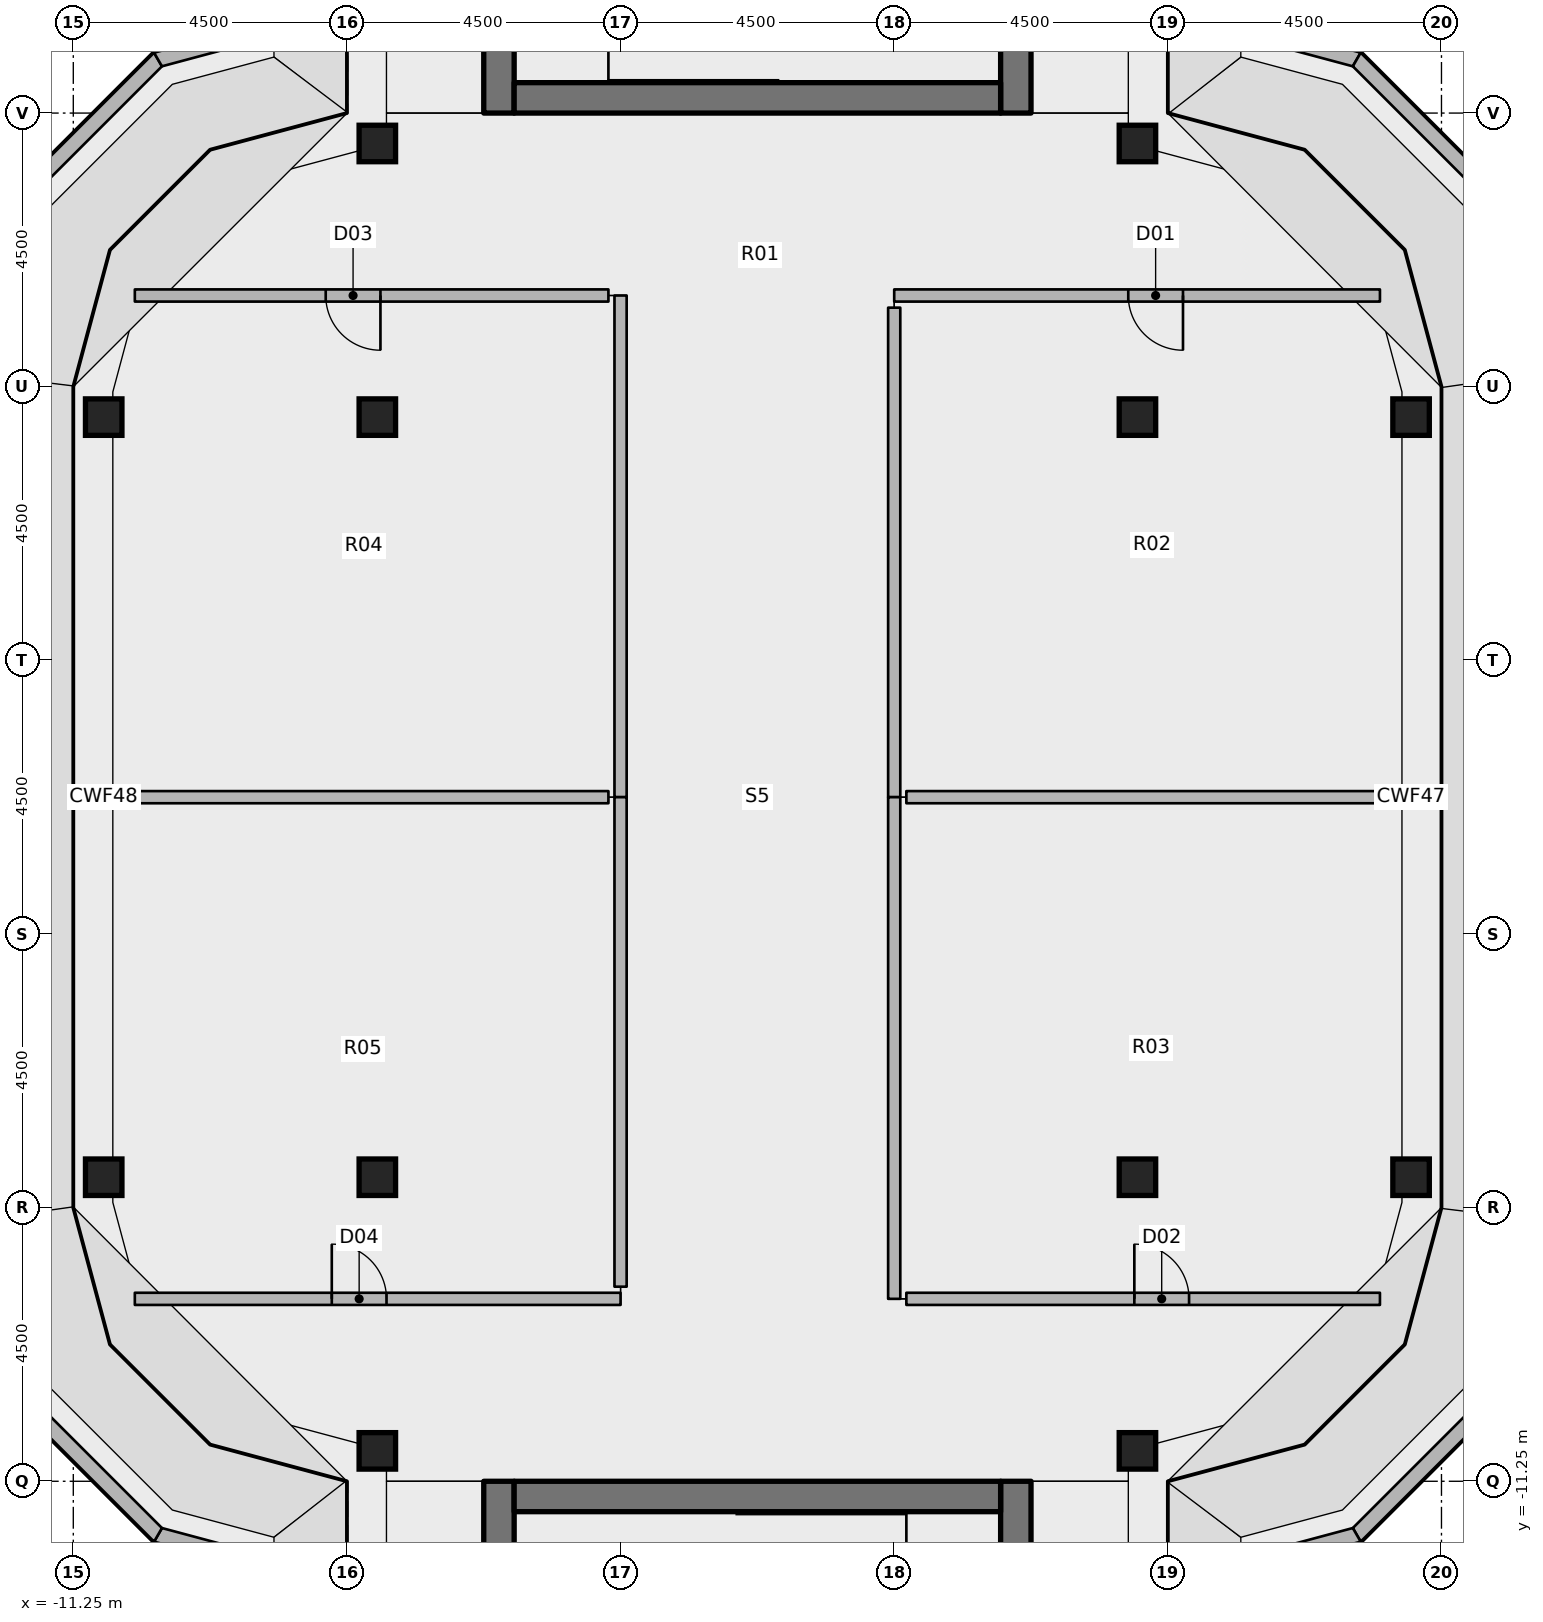
"""IFC4 building model, lengths in metres.
Left out: names, types, materials, properties, quantities, classifications, styles, units other than length and angle.
Written with IfcOpenShell. Run it as: python <this file> out.ifc"""

import sys

from ifc_helpers import new_model, si_unit, direction, frame, frame_2d, origin, origin_2d, place, context, subcontext, project, spatial, polyline, rectangle, outline, extrude, element, fill, save


model = new_model("IFC4")
c1 = context("Model", 3, precision=1e-05, world=origin(), true_north=direction((0.0, 1.0)))
c2 = subcontext(c1, "Body", "Model", "MODEL_VIEW")
j1 = project(units=[si_unit("LENGTHUNIT", "METRE"), si_unit("PLANEANGLEUNIT", "RADIAN")], contexts=[c1])
p1 = place(None, origin())
s1 = spatial("IfcSite", under=j1, at=p1, CompositionType="ELEMENT")
p2 = place(p1, origin())
s2 = spatial("IfcBuilding", under=s1, at=p2, CompositionType="ELEMENT")
p3 = place(p2, frame((0.0, 0.0, 298.8)))
s3 = spatial("IfcBuildingStorey", under=s2, at=p3, CompositionType="ELEMENT", Elevation=298.8)
for number, where, z_axis, x_axis in (
    (1, (-10.75, -6.25, 0.0), (0.0, 0.0, 1.0), (1.0, 0.0, 0.0)),
    (2, (-10.75, 6.25, 0.0), (0.0, 0.0, 1.0), (1.0, 0.0, 0.0)),
    (3, (-6.25, -10.75, 0.0), (0.0, 0.0, 1.0), (1.0, 0.0, 0.0)),
    (4, (-6.25, -6.25, 0.0), (0.0, 0.0, 1.0), (1.0, 0.0, 0.0)),
    (5, (-6.25, 6.25, 0.0), (0.0, 0.0, 1.0), (1.0, 0.0, 0.0)),
    (6, (-6.25, 10.75, 0.0), (0.0, 0.0, 1.0), (1.0, 0.0, 0.0)),
    (7, (6.25, -10.75, 0.0), (0.0, 0.0, 1.0), (1.0, 0.0, 0.0)),
    (8, (6.25, -6.25, 0.0), (0.0, 0.0, 1.0), (1.0, 0.0, 0.0)),
    (9, (6.25, 6.25, 0.0), (0.0, 0.0, 1.0), (1.0, 0.0, 0.0)),
    (10, (6.25, 10.75, 0.0), (0.0, 0.0, 1.0), (1.0, 0.0, 0.0)),
    (11, (10.75, -6.25, 0.0), (0.0, 0.0, 1.0), (1.0, 0.0, 0.0)),
    (12, (10.75, 6.25, 0.0), (0.0, 0.0, 1.0), (1.0, 0.0, 0.0)),
):
    element("IfcColumn", number, at=place(p3, frame(where, z_axis=z_axis, x_axis=x_axis)), inside=s3, PredefinedType="COLUMN", context=c2, shape_type="SweptSolid", body=[
        extrude(rectangle(XDim=0.6, YDim=0.6, at=origin_2d()), origin(), (0.0, 0.0, 1.0), 3.45),
    ])
p4 = place(p3, frame((-4.25, 11.25, 0.0), z_axis=(0.0, 0.0, 1.0), x_axis=(0.0, 1.0, 0.0)))
e13 = element("IfcWall", 13, at=p4, inside=s3, PredefinedType="SHEAR", context=c2, shape_type="SweptSolid", body=[
    extrude(rectangle(XDim=15.0, YDim=0.5, at=frame_2d((7.5, 0.0))), origin(), (0.0, 0.0, 1.0), 3.6),
])
p5 = place(p4, frame((7.15, 0.0, 0.0)))
e14 = element("IfcOpeningElement", 14, at=p5, cuts=e13, PredefinedType="OPENING", context=c2, shape_type="SweptSolid", body=[
    extrude(rectangle(XDim=1.5, YDim=2.3, at=frame_2d((0.75, 1.15))), frame((0.0, 0.26, 0.0), z_axis=(0.0, -1.0, 0.0), x_axis=(1.0, 0.0, 0.0)), (0.0, 0.0, 1.0), 0.52),
])
p6 = place(p4, frame((13.9, 0.0, 0.0)))
e15 = element("IfcOpeningElement", 15, at=p6, cuts=e13, PredefinedType="OPENING", context=c2, shape_type="SweptSolid", body=[
    extrude(rectangle(XDim=0.9, YDim=2.1, at=frame_2d((0.45, 1.05))), frame((0.0, 0.26, 0.0), z_axis=(0.0, -1.0, 0.0), x_axis=(1.0, 0.0, 0.0)), (0.0, 0.0, 1.0), 0.52),
])
p7 = place(p4, frame((1.15, 0.0, 0.0)))
e16 = element("IfcOpeningElement", 16, at=p7, cuts=e13, PredefinedType="OPENING", context=c2, shape_type="SweptSolid", body=[
    extrude(rectangle(XDim=1.2, YDim=2.1, at=frame_2d((0.6, 1.05))), frame((0.0, 0.26, 0.0), z_axis=(0.0, -1.0, 0.0), x_axis=(1.0, 0.0, 0.0)), (0.0, 0.0, 1.0), 0.52),
])
p8 = place(p3, frame((4.25, 11.25, 0.0), z_axis=(0.0, 0.0, 1.0), x_axis=(0.0, 1.0, 0.0)))
e17 = element("IfcWall", 17, at=p8, inside=s3, PredefinedType="SHEAR", context=c2, shape_type="SweptSolid", body=[
    extrude(rectangle(XDim=15.0, YDim=0.5, at=frame_2d((7.5, 0.0))), origin(), (0.0, 0.0, 1.0), 3.6),
])
p9 = place(p8, frame((7.15, 0.0, 0.0)))
e18 = element("IfcOpeningElement", 18, at=p9, cuts=e17, PredefinedType="OPENING", context=c2, shape_type="SweptSolid", body=[
    extrude(rectangle(XDim=1.5, YDim=2.3, at=frame_2d((0.75, 1.15))), frame((0.0, 0.26, 0.0), z_axis=(0.0, -1.0, 0.0), x_axis=(1.0, 0.0, 0.0)), (0.0, 0.0, 1.0), 0.52),
])
p10 = place(p8, frame((5.55, 0.0, 0.0)))
e19 = element("IfcOpeningElement", 19, at=p10, cuts=e17, PredefinedType="OPENING", context=c2, shape_type="SweptSolid", body=[
    extrude(rectangle(XDim=1.2, YDim=2.1, at=frame_2d((0.6, 1.05))), frame((0.0, 0.26, 0.0), z_axis=(0.0, -1.0, 0.0), x_axis=(1.0, 0.0, 0.0)), (0.0, 0.0, 1.0), 0.52),
])
p11 = place(p3, frame((-4.0, 11.5, 0.0), z_axis=(0.0, 0.0, 1.0), x_axis=(1.0, 0.0, 0.0)))
e20 = element("IfcWall", 20, at=p11, inside=s3, PredefinedType="SHEAR", context=c2, shape_type="SweptSolid", body=[
    extrude(rectangle(XDim=8.0, YDim=0.5, at=frame_2d((4.0, 0.0))), origin(), (0.0, 0.0, 1.0), 3.6),
])
p12 = place(p3, frame((-4.25, -11.25, 0.0), z_axis=(0.0, 0.0, 1.0), x_axis=(0.0, -1.0, 0.0)))
e21 = element("IfcWall", 21, at=p12, inside=s3, PredefinedType="SHEAR", context=c2, shape_type="SweptSolid", body=[
    extrude(rectangle(XDim=15.0, YDim=0.5, at=frame_2d((7.5, 0.0))), origin(), (0.0, 0.0, 1.0), 3.6),
])
p13 = place(p12, frame((7.15, 0.0, 0.0)))
e22 = element("IfcOpeningElement", 22, at=p13, cuts=e21, PredefinedType="OPENING", context=c2, shape_type="SweptSolid", body=[
    extrude(rectangle(XDim=1.5, YDim=2.3, at=frame_2d((0.75, 1.15))), frame((0.0, 0.26, 0.0), z_axis=(0.0, -1.0, 0.0), x_axis=(1.0, 0.0, 0.0)), (0.0, 0.0, 1.0), 0.52),
])
p14 = place(p12, frame((5.55, 0.0, 0.0)))
e23 = element("IfcOpeningElement", 23, at=p14, cuts=e21, PredefinedType="OPENING", context=c2, shape_type="SweptSolid", body=[
    extrude(rectangle(XDim=1.2, YDim=2.1, at=frame_2d((0.6, 1.05))), frame((0.0, 0.26, 0.0), z_axis=(0.0, -1.0, 0.0), x_axis=(1.0, 0.0, 0.0)), (0.0, 0.0, 1.0), 0.52),
])
p15 = place(p3, frame((4.25, -11.25, 0.0), z_axis=(0.0, 0.0, 1.0), x_axis=(0.0, -1.0, 0.0)))
e24 = element("IfcWall", 24, at=p15, inside=s3, PredefinedType="SHEAR", context=c2, shape_type="SweptSolid", body=[
    extrude(rectangle(XDim=15.0, YDim=0.5, at=frame_2d((7.5, 0.0))), origin(), (0.0, 0.0, 1.0), 3.6),
])
p16 = place(p15, frame((7.15, 0.0, 0.0)))
e25 = element("IfcOpeningElement", 25, at=p16, cuts=e24, PredefinedType="OPENING", context=c2, shape_type="SweptSolid", body=[
    extrude(rectangle(XDim=1.5, YDim=2.3, at=frame_2d((0.75, 1.15))), frame((0.0, 0.26, 0.0), z_axis=(0.0, -1.0, 0.0), x_axis=(1.0, 0.0, 0.0)), (0.0, 0.0, 1.0), 0.52),
])
p17 = place(p15, frame((13.9, 0.0, 0.0)))
e26 = element("IfcOpeningElement", 26, at=p17, cuts=e24, PredefinedType="OPENING", context=c2, shape_type="SweptSolid", body=[
    extrude(rectangle(XDim=0.9, YDim=2.1, at=frame_2d((0.45, 1.05))), frame((0.0, 0.26, 0.0), z_axis=(0.0, -1.0, 0.0), x_axis=(1.0, 0.0, 0.0)), (0.0, 0.0, 1.0), 0.52),
])
p18 = place(p15, frame((1.15, 0.0, 0.0)))
e27 = element("IfcOpeningElement", 27, at=p18, cuts=e24, PredefinedType="OPENING", context=c2, shape_type="SweptSolid", body=[
    extrude(rectangle(XDim=1.2, YDim=2.1, at=frame_2d((0.6, 1.05))), frame((0.0, 0.26, 0.0), z_axis=(0.0, -1.0, 0.0), x_axis=(1.0, 0.0, 0.0)), (0.0, 0.0, 1.0), 0.52),
])
p19 = place(p3, frame((-4.0, -11.5, 0.0), z_axis=(0.0, 0.0, 1.0), x_axis=(1.0, 0.0, 0.0)))
e28 = element("IfcWall", 28, at=p19, inside=s3, PredefinedType="SHEAR", context=c2, shape_type="SweptSolid", body=[
    extrude(rectangle(XDim=8.0, YDim=0.5, at=frame_2d((4.0, 0.0))), origin(), (0.0, 0.0, 1.0), 3.6),
])
p20 = place(p3, origin())
e29 = element("IfcWall", 29, at=p20, inside=s3, PredefinedType="PARAPET", context=c2, shape_type="SweptSolid", body=[
    extrude(outline(polyline([(-8.53, -12.616), (-9.921, -12.243), (-9.792, -12.019), (-8.28, -12.424), (-8.53, -12.616)])), origin(), (0.0, 0.0, 1.0), 1.22),
])
p21 = place(p3, origin())
e30 = element("IfcWall", 30, at=p21, inside=s3, PredefinedType="PARAPET", context=c2, shape_type="SweptSolid", body=[
    extrude(outline(polyline([(-9.921, -12.243), (-12.243, -9.921), (-12.019, -9.792), (-9.792, -12.019), (-9.921, -12.243)])), origin(), (0.0, 0.0, 1.0), 1.22),
])
p22 = place(p3, origin())
e31 = element("IfcWall", 31, at=p22, inside=s3, PredefinedType="PARAPET", context=c2, shape_type="SweptSolid", body=[
    extrude(outline(polyline([(-12.243, 9.921), (-9.921, 12.243), (-9.792, 12.019), (-12.019, 9.792), (-12.243, 9.921)])), origin(), (0.0, 0.0, 1.0), 1.22),
])
p23 = place(p3, origin())
e32 = element("IfcWall", 32, at=p23, inside=s3, PredefinedType="PARAPET", context=c2, shape_type="SweptSolid", body=[
    extrude(outline(polyline([(-9.921, 12.243), (-8.53, 12.616), (-8.28, 12.424), (-9.792, 12.019), (-9.921, 12.243)])), origin(), (0.0, 0.0, 1.0), 1.22),
])
p24 = place(p3, origin())
e33 = element("IfcWall", 33, at=p24, inside=s3, PredefinedType="PARAPET", context=c2, shape_type="SweptSolid", body=[
    extrude(outline(polyline([(8.53, 12.616), (9.921, 12.243), (9.792, 12.019), (8.28, 12.424), (8.53, 12.616)])), origin(), (0.0, 0.0, 1.0), 1.22),
])
p25 = place(p3, origin())
e34 = element("IfcWall", 34, at=p25, inside=s3, PredefinedType="PARAPET", context=c2, shape_type="SweptSolid", body=[
    extrude(outline(polyline([(9.921, 12.243), (12.243, 9.921), (12.019, 9.792), (9.792, 12.019), (9.921, 12.243)])), origin(), (0.0, 0.0, 1.0), 1.22),
])
p26 = place(p3, origin())
e35 = element("IfcWall", 35, at=p26, inside=s3, PredefinedType="PARAPET", context=c2, shape_type="SweptSolid", body=[
    extrude(outline(polyline([(12.243, -9.921), (9.921, -12.243), (9.792, -12.019), (12.019, -9.792), (12.243, -9.921)])), origin(), (0.0, 0.0, 1.0), 1.22),
])
p27 = place(p3, origin())
e36 = element("IfcWall", 36, at=p27, inside=s3, PredefinedType="PARAPET", context=c2, shape_type="SweptSolid", body=[
    extrude(outline(polyline([(9.921, -12.243), (8.53, -12.616), (8.28, -12.424), (9.792, -12.019), (9.921, -12.243)])), origin(), (0.0, 0.0, 1.0), 1.22),
])
p28 = place(p3, frame((10.238, 8.25, 0.0), z_axis=(0.0, 0.0, 1.0), x_axis=(-1.0, 0.0, 0.0)))
e37 = element("IfcWall", 37, at=p28, inside=s3, PredefinedType="PARTITIONING", context=c2, shape_type="SweptSolid", body=[
    extrude(rectangle(XDim=7.988, YDim=0.2, at=frame_2d((3.994, 0.0))), origin(), (0.0, 0.0, 1.0), 3.45),
])
p29 = place(p28, frame((3.239, 0.0, 0.0)))
e38 = element("IfcOpeningElement", 38, at=p29, cuts=e37, PredefinedType="OPENING", context=c2, shape_type="SweptSolid", body=[
    extrude(rectangle(XDim=0.9, YDim=2.1, at=frame_2d((0.45, 1.05))), frame((0.0, 0.11, 0.0), z_axis=(0.0, -1.0, 0.0), x_axis=(1.0, 0.0, 0.0)), (0.0, 0.0, 1.0), 0.22),
])
p30 = place(p3, frame((2.25, 8.05, 0.0), z_axis=(0.0, 0.0, 1.0), x_axis=(0.0, -1.0, 0.0)))
e39 = element("IfcWall", 39, at=p30, inside=s3, PredefinedType="PARTITIONING", context=c2, shape_type="SweptSolid", body=[
    extrude(rectangle(XDim=8.05, YDim=0.2, at=frame_2d((4.025, 0.0))), origin(), (0.0, 0.0, 1.0), 2.681),
])
p31 = place(p3, frame((2.25, 0.0, 0.0), z_axis=(0.0, 0.0, 1.0), x_axis=(0.0, -1.0, 0.0)))
e40 = element("IfcWall", 40, at=p31, inside=s3, PredefinedType="PARTITIONING", context=c2, shape_type="SweptSolid", body=[
    extrude(rectangle(XDim=8.25, YDim=0.2, at=frame_2d((4.125, 0.0))), origin(), (0.0, 0.0, 1.0), 2.681),
])
p32 = place(p3, frame((2.45, -8.25, 0.0), z_axis=(0.0, 0.0, 1.0), x_axis=(1.0, 0.0, 0.0)))
e41 = element("IfcWall", 41, at=p32, inside=s3, PredefinedType="PARTITIONING", context=c2, shape_type="SweptSolid", body=[
    extrude(rectangle(XDim=7.788, YDim=0.2, at=frame_2d((3.894, 0.0))), origin(), (0.0, 0.0, 1.0), 3.45),
])
p33 = place(p32, frame((3.749, 0.0, 0.0)))
e42 = element("IfcOpeningElement", 42, at=p33, cuts=e41, PredefinedType="OPENING", context=c2, shape_type="SweptSolid", body=[
    extrude(rectangle(XDim=0.9, YDim=2.1, at=frame_2d((0.45, 1.05))), frame((0.0, 0.11, 0.0), z_axis=(0.0, -1.0, 0.0), x_axis=(1.0, 0.0, 0.0)), (0.0, 0.0, 1.0), 0.22),
])
p34 = place(p3, frame((-2.25, 0.0, 0.0), z_axis=(0.0, 0.0, 1.0), x_axis=(0.0, 1.0, 0.0)))
e43 = element("IfcWall", 43, at=p34, inside=s3, PredefinedType="PARTITIONING", context=c2, shape_type="SweptSolid", body=[
    extrude(rectangle(XDim=8.25, YDim=0.2, at=frame_2d((4.125, 0.0))), origin(), (0.0, 0.0, 1.0), 2.681),
])
p35 = place(p3, frame((-2.45, 8.25, 0.0), z_axis=(0.0, 0.0, 1.0), x_axis=(-1.0, 0.0, 0.0)))
e44 = element("IfcWall", 44, at=p35, inside=s3, PredefinedType="PARTITIONING", context=c2, shape_type="SweptSolid", body=[
    extrude(rectangle(XDim=7.788, YDim=0.2, at=frame_2d((3.894, 0.0))), origin(), (0.0, 0.0, 1.0), 3.45),
])
p36 = place(p35, frame((3.749, 0.0, 0.0)))
e45 = element("IfcOpeningElement", 45, at=p36, cuts=e44, PredefinedType="OPENING", context=c2, shape_type="SweptSolid", body=[
    extrude(rectangle(XDim=0.9, YDim=2.1, at=frame_2d((0.45, 1.05))), frame((0.0, 0.11, 0.0), z_axis=(0.0, -1.0, 0.0), x_axis=(1.0, 0.0, 0.0)), (0.0, 0.0, 1.0), 0.22),
])
p37 = place(p3, frame((-10.238, -8.25, 0.0), z_axis=(0.0, 0.0, 1.0), x_axis=(1.0, 0.0, 0.0)))
e46 = element("IfcWall", 46, at=p37, inside=s3, PredefinedType="PARTITIONING", context=c2, shape_type="SweptSolid", body=[
    extrude(rectangle(XDim=7.988, YDim=0.2, at=frame_2d((3.994, 0.0))), origin(), (0.0, 0.0, 1.0), 3.45),
])
p38 = place(p37, frame((3.239, 0.0, 0.0)))
e47 = element("IfcOpeningElement", 47, at=p38, cuts=e46, PredefinedType="OPENING", context=c2, shape_type="SweptSolid", body=[
    extrude(rectangle(XDim=0.9, YDim=2.1, at=frame_2d((0.45, 1.05))), frame((0.0, 0.11, 0.0), z_axis=(0.0, -1.0, 0.0), x_axis=(1.0, 0.0, 0.0)), (0.0, 0.0, 1.0), 0.22),
])
p39 = place(p3, frame((-2.25, -8.05, 0.0), z_axis=(0.0, 0.0, 1.0), x_axis=(0.0, 1.0, 0.0)))
e48 = element("IfcWall", 48, at=p39, inside=s3, PredefinedType="PARTITIONING", context=c2, shape_type="SweptSolid", body=[
    extrude(rectangle(XDim=8.05, YDim=0.2, at=frame_2d((4.025, 0.0))), origin(), (0.0, 0.0, 1.0), 2.681),
])
for number, where, z_axis, x_axis in (
    (49, (10.67, 0.0, 0.0), (0.0, 0.0, 1.0), (-1.0, 0.0, 0.0)),
    (50, (-2.45, 0.0, 0.0), (0.0, 0.0, 1.0), (-1.0, 0.0, 0.0)),
):
    element("IfcWall", number, at=place(p3, frame(where, z_axis=z_axis, x_axis=x_axis)), inside=s3, PredefinedType="PARTITIONING", context=c2, shape_type="SweptSolid", body=[
        extrude(rectangle(XDim=8.22, YDim=0.2, at=frame_2d((4.11, 0.0))), origin(), (0.0, 0.0, 1.0), 2.828),
    ])
p40 = place(p29, origin())
e51 = element("IfcDoor", 51, at=p40, inside=s3, OperationType="SINGLE_SWING_LEFT", PredefinedType="DOOR", context=c2, shape_type="SweptSolid", body=[
    extrude(rectangle(XDim=0.9, YDim=2.1, at=frame_2d((0.45, 1.05))), frame((0.0, 0.025, 0.0), z_axis=(0.0, -1.0, 0.0), x_axis=(1.0, 0.0, 0.0)), (0.0, 0.0, 1.0), 0.05),
])
fill(e38, e51)
p41 = place(p33, origin())
e52 = element("IfcDoor", 52, at=p41, inside=s3, OperationType="SINGLE_SWING_LEFT", PredefinedType="DOOR", context=c2, shape_type="SweptSolid", body=[
    extrude(rectangle(XDim=0.9, YDim=2.1, at=frame_2d((0.45, 1.05))), frame((0.0, 0.025, 0.0), z_axis=(0.0, -1.0, 0.0), x_axis=(1.0, 0.0, 0.0)), (0.0, 0.0, 1.0), 0.05),
])
fill(e42, e52)
p42 = place(p36, origin())
e53 = element("IfcDoor", 53, at=p42, inside=s3, OperationType="SINGLE_SWING_LEFT", PredefinedType="DOOR", context=c2, shape_type="SweptSolid", body=[
    extrude(rectangle(XDim=0.9, YDim=2.1, at=frame_2d((0.45, 1.05))), frame((0.0, 0.025, 0.0), z_axis=(0.0, -1.0, 0.0), x_axis=(1.0, 0.0, 0.0)), (0.0, 0.0, 1.0), 0.05),
])
fill(e45, e53)
p43 = place(p38, origin())
e54 = element("IfcDoor", 54, at=p43, inside=s3, OperationType="SINGLE_SWING_LEFT", PredefinedType="DOOR", context=c2, shape_type="SweptSolid", body=[
    extrude(rectangle(XDim=0.9, YDim=2.1, at=frame_2d((0.45, 1.05))), frame((0.0, 0.025, 0.0), z_axis=(0.0, -1.0, 0.0), x_axis=(1.0, 0.0, 0.0)), (0.0, 0.0, 1.0), 0.05),
])
fill(e47, e54)
save(model, sys.argv[1])
